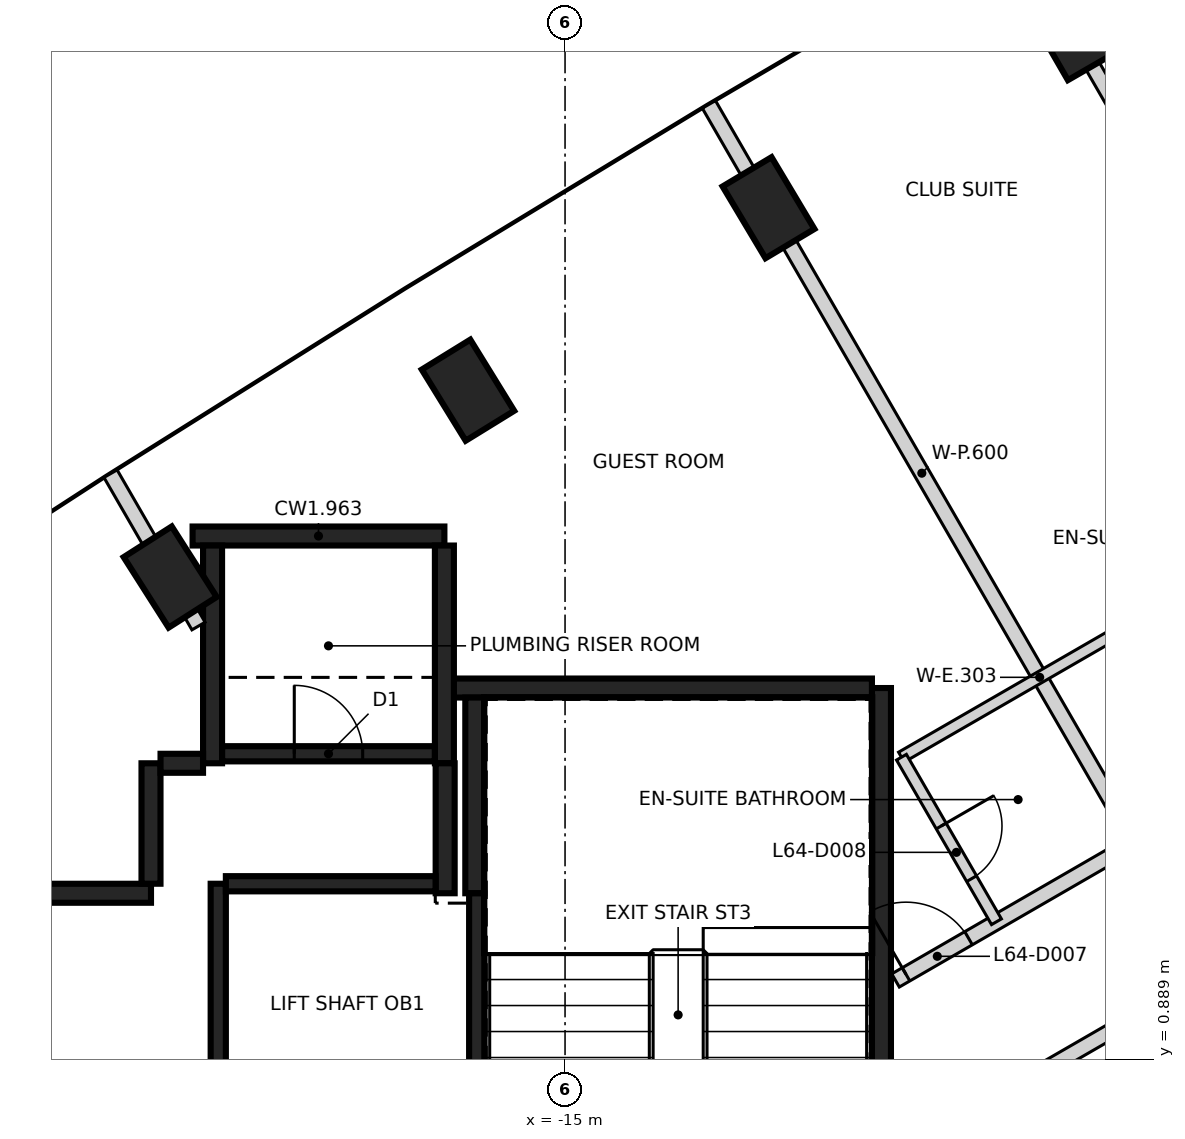
"""IFC4 building model, lengths in metres.
Left out: names, types, materials, properties, quantities, classifications, styles, units other than length and angle.
Written with IfcOpenShell. Run it as: python <this file> out.ifc"""

import sys

from ifc_helpers import new_model, si_unit, direction, frame, frame_2d, origin, origin_2d, place, context, subcontext, project, spatial, rectangle, extrude, element, fill, save


model = new_model("IFC4")
c1 = context("Model", 3, precision=1e-05, world=origin(), true_north=direction((0.0, 1.0)))
c2 = subcontext(c1, "Body", "Model", "MODEL_VIEW")
j1 = project(units=[si_unit("LENGTHUNIT", "METRE"), si_unit("PLANEANGLEUNIT", "RADIAN")], contexts=[c1])
p1 = place(None, origin())
s1 = spatial("IfcSite", under=j1, at=p1, CompositionType="ELEMENT")
p2 = place(p1, origin())
s2 = spatial("IfcBuilding", under=s1, at=p2, CompositionType="ELEMENT")
p3 = place(p2, frame((0.0, 0.0, 253.8)))
s3 = spatial("IfcBuildingStorey", under=s2, at=p3, CompositionType="ELEMENT", Elevation=253.8)
for number, where, z_axis, x_axis in (
    (1, (-8.335, 14.436, -0.35), (0.0, 0.0, 1.0), (-0.5, 0.866, 0.0)),
    (2, (-12.323, 12.094, -0.35), (0.0, 0.0, 1.0), (-0.513, 0.858, 0.0)),
    (3, (-16.277, 9.693, -0.35), (0.0, 0.0, 1.0), (-0.525, 0.851, 0.0)),
    (4, (-20.195, 7.235, -0.35), (0.0, 0.0, 1.0), (-0.538, 0.843, 0.0)),
):
    element("IfcColumn", number, at=place(p3, frame(where, z_axis=z_axis, x_axis=x_axis)), inside=s3, PredefinedType="COLUMN", context=c2, shape_type="SweptSolid", body=[
        extrude(rectangle(XDim=1.1, YDim=0.75, at=origin_2d()), origin(), (0.0, 0.0, 1.0), 2.64),
    ])
p4 = place(p3, frame((-10.837, 5.775, 0.0), z_axis=(0.0, 0.0, 1.0), x_axis=(0.0, -1.0, 0.0)))
e5 = element("IfcWall", 5, at=p4, inside=s3, PredefinedType="SHEAR", context=c2, shape_type="SweptSolid", body=[
    extrude(rectangle(XDim=11.55, YDim=0.25, at=frame_2d((5.775, 0.0))), origin(), (0.0, 0.0, 1.0), 3.2),
])
p5 = place(p4, frame((10.025, 0.0, 0.0)))
e6 = element("IfcOpeningElement", 6, at=p5, cuts=e5, PredefinedType="OPENING", context=c2, shape_type="SweptSolid", body=[
    extrude(rectangle(XDim=1.2, YDim=2.1, at=frame_2d((0.6, 1.05))), frame((0.0, 0.135, 0.0), z_axis=(0.0, -1.0, 0.0), x_axis=(1.0, 0.0, 0.0)), (0.0, 0.0, 1.0), 0.27),
])
p6 = place(p4, frame((8.725, 0.0, 0.0)))
e7 = element("IfcOpeningElement", 7, at=p6, cuts=e5, PredefinedType="OPENING", context=c2, shape_type="SweptSolid", body=[
    extrude(rectangle(XDim=1.2, YDim=2.1, at=frame_2d((0.6, 1.05))), frame((0.0, 0.135, 0.0), z_axis=(0.0, -1.0, 0.0), x_axis=(1.0, 0.0, 0.0)), (0.0, 0.0, 1.0), 0.27),
])
p7 = place(p3, frame((-16.472, 5.775, 0.0), z_axis=(0.0, 0.0, 1.0), x_axis=(1.0, 0.0, 0.0)))
e8 = element("IfcWall", 8, at=p7, inside=s3, PredefinedType="SHEAR", context=c2, shape_type="SweptSolid", body=[
    extrude(rectangle(XDim=5.51, YDim=0.25, at=frame_2d((2.755, 0.0))), origin(), (0.0, 0.0, 1.0), 3.2),
])
p8 = place(p3, frame((-19.9, 7.775, 0.0), z_axis=(0.0, 0.0, 1.0), x_axis=(1.0, 0.0, 0.0)))
e9 = element("IfcWall", 9, at=p8, inside=s3, PredefinedType="SHEAR", context=c2, shape_type="SweptSolid", body=[
    extrude(rectangle(XDim=3.313, YDim=0.25, at=frame_2d((1.656, 0.0))), origin(), (0.0, 0.0, 1.0), 3.2),
])
for number, where, z_axis, x_axis in (
    (10, (-16.587, 7.65, 0.0), (0.0, 0.0, 1.0), (0.0, -1.0, 0.0)),
    (11, (-19.637, 4.785, 0.0), (0.0, 0.0, 1.0), (0.0, 1.0, 0.0)),
):
    element("IfcWall", number, at=place(p3, frame(where, z_axis=z_axis, x_axis=x_axis)), inside=s3, PredefinedType="SHEAR", context=c2, shape_type="SweptSolid", body=[
        extrude(rectangle(XDim=2.865, YDim=0.25, at=frame_2d((1.432, 0.0))), origin(), (0.0, 0.0, 1.0), 3.2),
    ])
p9 = place(p3, frame((-16.187, 3.075, 0.0), z_axis=(0.0, 0.0, 1.0), x_axis=(0.0, 1.0, 0.0)))
e12 = element("IfcWall", 12, at=p9, inside=s3, PredefinedType="SHEAR", context=c2, shape_type="SweptSolid", body=[
    extrude(rectangle(XDim=2.575, YDim=0.25, at=frame_2d((1.287, 0.0))), origin(), (0.0, 0.0, 1.0), 3.2),
])
p10 = place(p3, frame((-22.312, 3.075, 0.0), z_axis=(0.0, 0.0, 1.0), x_axis=(1.0, 0.0, 0.0)))
e13 = element("IfcWall", 13, at=p10, inside=s3, PredefinedType="SHEAR", context=c2, shape_type="SweptSolid", body=[
    extrude(rectangle(XDim=1.865, YDim=0.25, at=frame_2d((0.932, 0.0))), origin(), (0.0, 0.0, 1.0), 3.2),
])
p11 = place(p3, frame((-16.577, 4.785, 0.0), z_axis=(0.0, 0.0, 1.0), x_axis=(0.0, -1.0, 0.0)))
e14 = element("IfcWall", 14, at=p11, inside=s3, PredefinedType="SHEAR", context=c2, shape_type="SweptSolid", body=[
    extrude(rectangle(XDim=1.71, YDim=0.25, at=frame_2d((0.855, 0.0))), origin(), (0.0, 0.0, 1.0), 3.2),
])
p12 = place(p3, frame((-20.447, 3.2, 0.0), z_axis=(0.0, 0.0, 1.0), x_axis=(0.0, 1.0, 0.0)))
e15 = element("IfcWall", 15, at=p12, inside=s3, PredefinedType="SHEAR", context=c2, shape_type="SweptSolid", body=[
    extrude(rectangle(XDim=1.584, YDim=0.25, at=frame_2d((0.792, 0.0))), origin(), (0.0, 0.0, 1.0), 3.2),
])
p13 = place(p3, frame((-20.322, 4.785, 0.0), z_axis=(0.0, 0.0, 1.0), x_axis=(1.0, 0.0, 0.0)))
e16 = element("IfcWall", 16, at=p13, inside=s3, PredefinedType="SHEAR", context=c2, shape_type="SweptSolid", body=[
    extrude(rectangle(XDim=0.559, YDim=0.25, at=frame_2d((0.28, 0.0))), origin(), (0.0, 0.0, 1.0), 3.2),
])
p14 = place(p3, frame((-16.162, 3.074, 0.0), z_axis=(0.0, 0.0, 1.0), x_axis=(0.0, -1.0, 0.0)))
e17 = element("IfcWall", 17, at=p14, inside=s3, PredefinedType="SHEAR", context=c2, shape_type="SweptSolid", body=[
    extrude(rectangle(XDim=5.974, YDim=0.2, at=frame_2d((2.987, 0.0))), origin(), (0.0, 0.0, 1.0), 3.2),
])
p15 = place(p3, frame((-19.562, -2.9, 0.0), z_axis=(0.0, 0.0, 1.0), x_axis=(0.0, 1.0, 0.0)))
e18 = element("IfcWall", 18, at=p15, inside=s3, PredefinedType="SHEAR", context=c2, shape_type="SweptSolid", body=[
    extrude(rectangle(XDim=6.1, YDim=0.2, at=frame_2d((3.05, 0.0))), origin(), (0.0, 0.0, 1.0), 3.2),
])
p16 = place(p3, frame((-19.511, 4.91, 0.0), z_axis=(0.0, 0.0, 1.0), x_axis=(1.0, 0.0, 0.0)))
e19 = element("IfcWall", 19, at=p16, inside=s3, PredefinedType="SHEAR", context=c2, shape_type="SweptSolid", body=[
    extrude(rectangle(XDim=2.798, YDim=0.2, at=frame_2d((1.399, 0.0))), origin(), (0.0, 0.0, 1.0), 3.2),
])
p17 = place(p16, frame((0.949, 0.0, 0.0)))
e20 = element("IfcOpeningElement", 20, at=p17, cuts=e19, PredefinedType="OPENING", context=c2, shape_type="SweptSolid", body=[
    extrude(rectangle(XDim=0.9, YDim=2.1, at=frame_2d((0.45, 1.05))), frame((0.0, 0.11, 0.0), z_axis=(0.0, -1.0, 0.0), x_axis=(1.0, 0.0, 0.0)), (0.0, 0.0, 1.0), 0.22),
])
p18 = place(p3, frame((-19.462, 3.2, 0.0), z_axis=(0.0, 0.0, 1.0), x_axis=(1.0, 0.0, 0.0)))
e21 = element("IfcWall", 21, at=p18, inside=s3, PredefinedType="SHEAR", context=c2, shape_type="SweptSolid", body=[
    extrude(rectangle(XDim=2.759, YDim=0.2, at=frame_2d((1.379, 0.0))), origin(), (0.0, 0.0, 1.0), 3.2),
])
p19 = place(p3, frame((-10.652, 1.928, 0.0), z_axis=(0.0, 0.0, 1.0), x_axis=(0.865793573301, 0.500401327367, 0.0)))
e22 = element("IfcWall", 22, at=p19, inside=s3, PredefinedType="PARTITIONING", context=c2, shape_type="SweptSolid", body=[
    extrude(rectangle(XDim=12.886, YDim=0.2, at=frame_2d((6.443, 0.0))), origin(), (0.0, 0.0, 1.0), 3.2),
])
p20 = place(p19, frame((7.123, 0.0, 0.0)))
e23 = element("IfcOpeningElement", 23, at=p20, cuts=e22, PredefinedType="OPENING", context=c2, shape_type="SweptSolid", body=[
    extrude(rectangle(XDim=0.95, YDim=2.1, at=frame_2d((0.475, 1.05))), frame((0.0, 0.11, 0.0), z_axis=(0.0, -1.0, 0.0), x_axis=(1.0, 0.0, 0.0)), (0.0, 0.0, 1.0), 0.22),
])
p21 = place(p19, frame((0.16, 0.0, 0.0)))
e24 = element("IfcOpeningElement", 24, at=p21, cuts=e22, PredefinedType="OPENING", context=c2, shape_type="SweptSolid", body=[
    extrude(rectangle(XDim=0.95, YDim=2.1, at=frame_2d((0.475, 1.05))), frame((0.0, 0.11, 0.0), z_axis=(0.0, -1.0, 0.0), x_axis=(1.0, 0.0, 0.0)), (0.0, 0.0, 1.0), 0.22),
])
p22 = place(p3, frame((-8.612, 0.801, 0.0), z_axis=(0.0, 0.0, 1.0), x_axis=(0.866005560651, 0.500034367741, 0.0)))
e25 = element("IfcWall", 25, at=p22, inside=s3, PredefinedType="PARTITIONING", context=c2, shape_type="SweptSolid", body=[
    extrude(rectangle(XDim=14.115, YDim=0.2, at=frame_2d((7.058, 0.0))), origin(), (0.0, 0.0, 1.0), 3.2),
])
p23 = place(p22, frame((10.131, 0.0, 0.0)))
e26 = element("IfcOpeningElement", 26, at=p23, cuts=e25, PredefinedType="OPENING", context=c2, shape_type="SweptSolid", body=[
    extrude(rectangle(XDim=0.9, YDim=2.1, at=frame_2d((0.45, 1.05))), frame((0.0, 0.11, 0.0), z_axis=(0.0, -1.0, 0.0), x_axis=(1.0, 0.0, 0.0)), (0.0, 0.0, 1.0), 0.22),
])
p24 = place(p22, frame((3.085, 0.0, 0.0)))
e27 = element("IfcOpeningElement", 27, at=p24, cuts=e25, PredefinedType="OPENING", context=c2, shape_type="SweptSolid", body=[
    extrude(rectangle(XDim=0.9, YDim=2.1, at=frame_2d((0.45, 1.05))), frame((0.0, 0.11, 0.0), z_axis=(0.0, -1.0, 0.0), x_axis=(1.0, 0.0, 0.0)), (0.0, 0.0, 1.0), 0.22),
])
p25 = place(p3, frame((-20.979, 8.595, 0.0), z_axis=(0.0, 0.0, 1.0), x_axis=(0.499950711303, -0.866053858757, 0.0)))
e28 = element("IfcWall", 28, at=p25, inside=s3, PredefinedType="PARTITIONING", context=c2, shape_type="SweptSolid", body=[
    extrude(rectangle(XDim=2.315, YDim=0.2, at=frame_2d((1.157, 0.0))), origin(), (0.0, 0.0, 1.0), 3.2),
])
p26 = place(p3, frame((-13.107, 13.453, 0.0), z_axis=(0.0, 0.0, 1.0), x_axis=(0.50003870279, -0.866003057565, 0.0)))
e29 = element("IfcWall", 29, at=p26, inside=s3, PredefinedType="PARTITIONING", context=c2, shape_type="SweptSolid", body=[
    extrude(rectangle(XDim=11.204, YDim=0.2, at=frame_2d((5.602, 0.0))), origin(), (0.0, 0.0, 1.0), 3.2),
])
p27 = place(p3, frame((-9.119, 15.795, 0.0), z_axis=(0.0, 0.0, 1.0), x_axis=(0.500015176972, -0.866016641178, 0.0)))
e30 = element("IfcWall", 30, at=p27, inside=s3, PredefinedType="PARTITIONING", context=c2, shape_type="SweptSolid", body=[
    extrude(rectangle(XDim=11.239, YDim=0.2, at=frame_2d((5.619, 0.0))), origin(), (0.0, 0.0, 1.0), 3.2),
])
p28 = place(p3, frame((-10.574, 4.866, 0.0), z_axis=(0.0, 0.0, 1.0), x_axis=(0.866052994476, 0.499952208475, 0.0)))
e31 = element("IfcWall", 31, at=p28, inside=s3, PredefinedType="PARTITIONING", context=c2, shape_type="SweptSolid", body=[
    extrude(rectangle(XDim=4.201, YDim=0.15, at=frame_2d((2.1, 0.0))), origin(), (0.0, 0.0, 1.0), 3.2),
])
p29 = place(p3, frame((-10.574, 4.865, 0.0), z_axis=(0.0, 0.0, 1.0), x_axis=(0.500004234368, -0.866022959057, 0.0)))
e32 = element("IfcWall", 32, at=p29, inside=s3, PredefinedType="PARTITIONING", context=c2, shape_type="SweptSolid", body=[
    extrude(rectangle(XDim=2.5, YDim=0.15, at=frame_2d((1.25, 0.0))), origin(), (0.0, 0.0, 1.0), 3.2),
])
p30 = place(p29, frame((1.045, 0.0, 0.0)))
e33 = element("IfcOpeningElement", 33, at=p30, cuts=e32, PredefinedType="OPENING", context=c2, shape_type="SweptSolid", body=[
    extrude(rectangle(XDim=0.8, YDim=2.1, at=frame_2d((0.4, 1.05))), frame((0.0, 0.085, 0.0), z_axis=(0.0, -1.0, 0.0), x_axis=(1.0, 0.0, 0.0)), (0.0, 0.0, 1.0), 0.17),
])
p31 = place(p17, origin())
e34 = element("IfcDoor", 34, at=p31, inside=s3, OperationType="SINGLE_SWING_RIGHT", PredefinedType="DOOR", context=c2, shape_type="SweptSolid", body=[
    extrude(rectangle(XDim=0.9, YDim=2.1, at=frame_2d((0.45, 1.05))), frame((0.0, 0.025, 0.0), z_axis=(0.0, -1.0, 0.0), x_axis=(1.0, 0.0, 0.0)), (0.0, 0.0, 1.0), 0.05),
])
fill(e20, e34)
p32 = place(p21, origin())
e35 = element("IfcDoor", 35, at=p32, inside=s3, OperationType="SINGLE_SWING_LEFT", PredefinedType="DOOR", context=c2, shape_type="SweptSolid", body=[
    extrude(rectangle(XDim=0.95, YDim=2.1, at=frame_2d((0.475, 1.05))), frame((0.0, 0.025, 0.0), z_axis=(0.0, -1.0, 0.0), x_axis=(1.0, 0.0, 0.0)), (0.0, 0.0, 1.0), 0.05),
])
fill(e24, e35)
p33 = place(p30, frame((0.8, 0.0, 0.0), z_axis=(0.0, 0.0, 1.0), x_axis=(-1.0, 0.0, 0.0)))
e36 = element("IfcDoor", 36, at=p33, inside=s3, OperationType="SINGLE_SWING_LEFT", PredefinedType="DOOR", context=c2, shape_type="SweptSolid", body=[
    extrude(rectangle(XDim=0.8, YDim=2.1, at=frame_2d((0.4, 1.05))), frame((0.0, 0.025, 0.0), z_axis=(0.0, -1.0, 0.0), x_axis=(1.0, 0.0, 0.0)), (0.0, 0.0, 1.0), 0.05),
])
fill(e33, e36)
save(model, sys.argv[1])
